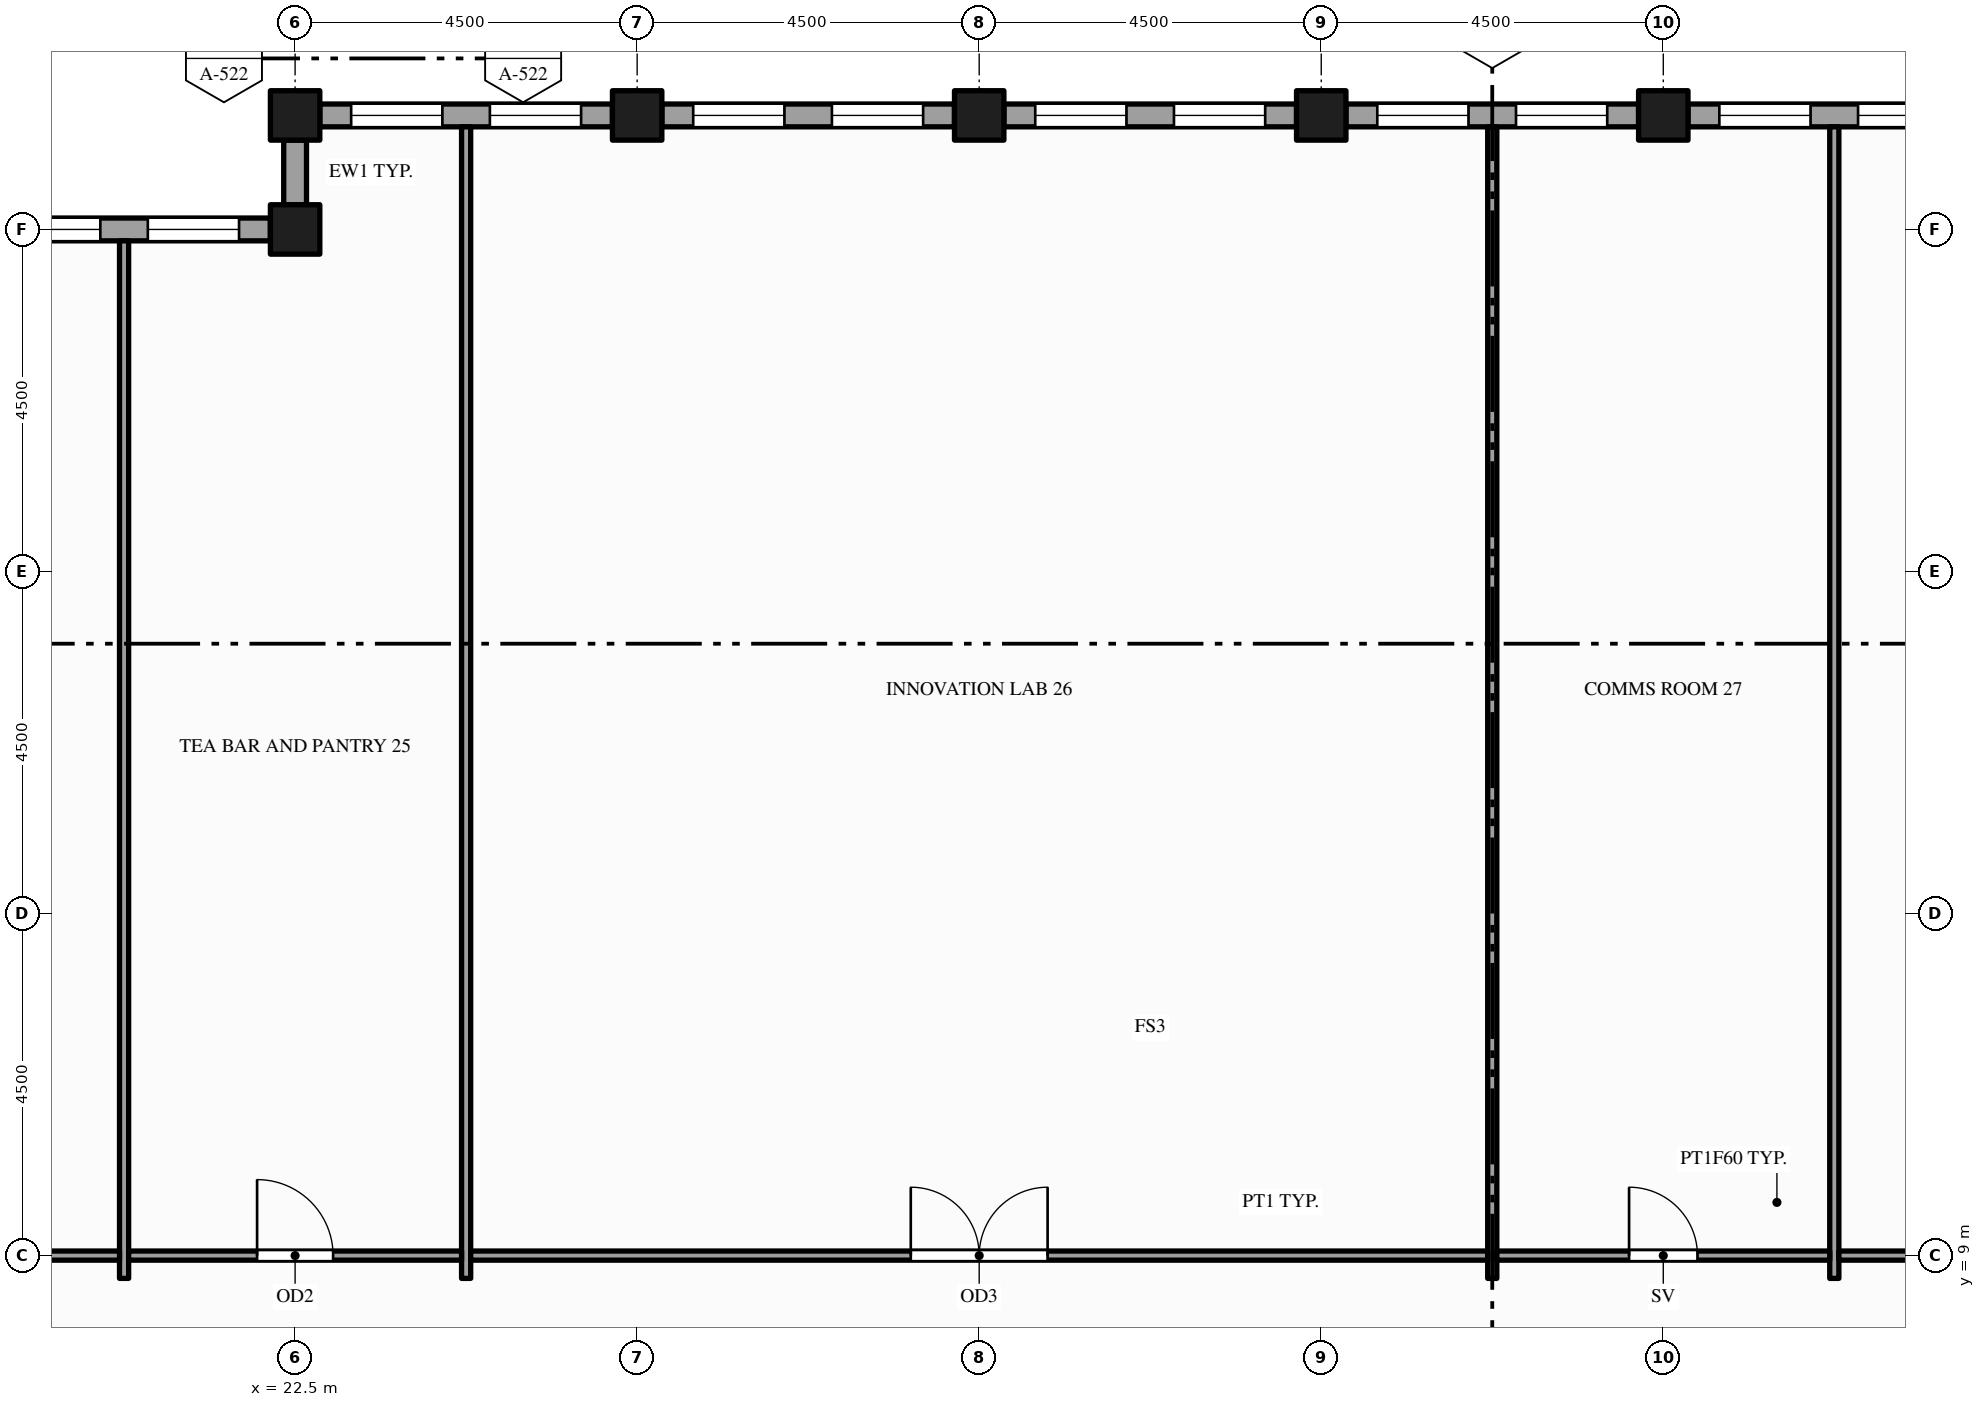
"""IFC4 building model, lengths in metres.
Left out: names, types, materials, properties, quantities, classifications, styles, units other than length and angle.
Written with IfcOpenShell. Run it as: python <this file> out.ifc"""

import sys

from ifc_helpers import new_model, si_unit, direction, frame, frame_2d, origin, origin_2d, place, context, subcontext, project, spatial, rectangle, hollow_rectangle, extrude, element, fill, save


model = new_model("IFC4")
c1 = context("Model", 3, precision=1e-05, world=origin(), true_north=direction((0.0, 1.0)))
c2 = subcontext(c1, "Body", "Model", "MODEL_VIEW")
j1 = project(units=[si_unit("LENGTHUNIT", "METRE"), si_unit("PLANEANGLEUNIT", "RADIAN")], contexts=[c1])
p1 = place(None, origin())
s1 = spatial("IfcSite", under=j1, at=p1, CompositionType="ELEMENT")
p2 = place(p1, origin())
s2 = spatial("IfcBuilding", under=s1, at=p2, CompositionType="ELEMENT")
p3 = place(p2, frame((0.0, 0.0, 269.0)))
s3 = spatial("IfcBuildingStorey", under=s2, at=p3, CompositionType="ELEMENT", Elevation=269.0)
for number, where, z_axis, x_axis in (
    (1, (22.5, 22.5, -0.15), (0.0, 0.0, 1.0), (1.0, 0.0, 0.0)),
    (2, (22.5, 24.0, -0.15), (0.0, 0.0, 1.0), (1.0, 0.0, 0.0)),
    (3, (27.0, 24.0, -0.15), (0.0, 0.0, 1.0), (1.0, 0.0, 0.0)),
    (4, (31.5, 24.0, -0.15), (0.0, 0.0, 1.0), (1.0, 0.0, 0.0)),
    (5, (36.0, 24.0, -0.15), (0.0, 0.0, 1.0), (1.0, 0.0, 0.0)),
    (6, (40.5, 24.0, -0.15), (0.0, 0.0, 1.0), (1.0, 0.0, 0.0)),
):
    element("IfcColumn", number, at=place(p3, frame(where, z_axis=z_axis, x_axis=x_axis)), inside=s3, PredefinedType="COLUMN", context=c2, shape_type="SweptSolid", body=[
        extrude(hollow_rectangle(XDim=0.65, YDim=0.65, WallThickness=0.032, at=origin_2d()), origin(), (0.0, 0.0, 1.0), 4.0),
    ])
p4 = place(p3, frame((44.675, 24.0, 0.0), z_axis=(0.0, 0.0, 1.0), x_axis=(-1.0, 0.0, 0.0)))
e7 = element("IfcWall", 7, at=p4, inside=s3, PredefinedType="STANDARD", context=c2, shape_type="SweptSolid", body=[
    extrude(rectangle(XDim=3.85, YDim=0.3, at=frame_2d((1.925, 0.0))), origin(), (0.0, 0.0, 1.0), 2.87),
])
p5 = place(p4, frame((0.413, 0.0, 0.9)))
e8 = element("IfcOpeningElement", 8, at=p5, cuts=e7, PredefinedType="OPENING", context=c2, shape_type="SweptSolid", body=[
    extrude(rectangle(XDim=1.2, YDim=1.75, at=frame_2d((0.6, 0.875))), frame((0.0, 0.16, 0.0), z_axis=(0.0, -1.0, 0.0), x_axis=(1.0, 0.0, 0.0)), (0.0, 0.0, 1.0), 0.32),
])
p6 = place(p4, frame((2.238, 0.0, 0.9)))
e9 = element("IfcOpeningElement", 9, at=p6, cuts=e7, PredefinedType="OPENING", context=c2, shape_type="SweptSolid", body=[
    extrude(rectangle(XDim=1.2, YDim=1.75, at=frame_2d((0.6, 0.875))), frame((0.0, 0.16, 0.0), z_axis=(0.0, -1.0, 0.0), x_axis=(1.0, 0.0, 0.0)), (0.0, 0.0, 1.0), 0.32),
])
p7 = place(p3, frame((40.175, 24.0, 0.0), z_axis=(0.0, 0.0, 1.0), x_axis=(-1.0, 0.0, 0.0)))
e10 = element("IfcWall", 10, at=p7, inside=s3, PredefinedType="STANDARD", context=c2, shape_type="SweptSolid", body=[
    extrude(rectangle(XDim=3.85, YDim=0.3, at=frame_2d((1.925, 0.0))), origin(), (0.0, 0.0, 1.0), 2.87),
])
p8 = place(p7, frame((0.413, 0.0, 0.9)))
e11 = element("IfcOpeningElement", 11, at=p8, cuts=e10, PredefinedType="OPENING", context=c2, shape_type="SweptSolid", body=[
    extrude(rectangle(XDim=1.2, YDim=1.75, at=frame_2d((0.6, 0.875))), frame((0.0, 0.16, 0.0), z_axis=(0.0, -1.0, 0.0), x_axis=(1.0, 0.0, 0.0)), (0.0, 0.0, 1.0), 0.32),
])
p9 = place(p7, frame((2.238, 0.0, 0.9)))
e12 = element("IfcOpeningElement", 12, at=p9, cuts=e10, PredefinedType="OPENING", context=c2, shape_type="SweptSolid", body=[
    extrude(rectangle(XDim=1.2, YDim=1.75, at=frame_2d((0.6, 0.875))), frame((0.0, 0.16, 0.0), z_axis=(0.0, -1.0, 0.0), x_axis=(1.0, 0.0, 0.0)), (0.0, 0.0, 1.0), 0.32),
])
p10 = place(p3, frame((35.675, 24.0, 0.0), z_axis=(0.0, 0.0, 1.0), x_axis=(-1.0, 0.0, 0.0)))
e13 = element("IfcWall", 13, at=p10, inside=s3, PredefinedType="STANDARD", context=c2, shape_type="SweptSolid", body=[
    extrude(rectangle(XDim=3.85, YDim=0.3, at=frame_2d((1.925, 0.0))), origin(), (0.0, 0.0, 1.0), 2.87),
])
p11 = place(p10, frame((0.413, 0.0, 0.9)))
e14 = element("IfcOpeningElement", 14, at=p11, cuts=e13, PredefinedType="OPENING", context=c2, shape_type="SweptSolid", body=[
    extrude(rectangle(XDim=1.2, YDim=1.75, at=frame_2d((0.6, 0.875))), frame((0.0, 0.16, 0.0), z_axis=(0.0, -1.0, 0.0), x_axis=(1.0, 0.0, 0.0)), (0.0, 0.0, 1.0), 0.32),
])
p12 = place(p10, frame((2.238, 0.0, 0.9)))
e15 = element("IfcOpeningElement", 15, at=p12, cuts=e13, PredefinedType="OPENING", context=c2, shape_type="SweptSolid", body=[
    extrude(rectangle(XDim=1.2, YDim=1.75, at=frame_2d((0.6, 0.875))), frame((0.0, 0.16, 0.0), z_axis=(0.0, -1.0, 0.0), x_axis=(1.0, 0.0, 0.0)), (0.0, 0.0, 1.0), 0.32),
])
p13 = place(p3, frame((31.175, 24.0, 0.0), z_axis=(0.0, 0.0, 1.0), x_axis=(-1.0, 0.0, 0.0)))
e16 = element("IfcWall", 16, at=p13, inside=s3, PredefinedType="STANDARD", context=c2, shape_type="SweptSolid", body=[
    extrude(rectangle(XDim=3.85, YDim=0.3, at=frame_2d((1.925, 0.0))), origin(), (0.0, 0.0, 1.0), 2.87),
])
p14 = place(p13, frame((0.413, 0.0, 0.9)))
e17 = element("IfcOpeningElement", 17, at=p14, cuts=e16, PredefinedType="OPENING", context=c2, shape_type="SweptSolid", body=[
    extrude(rectangle(XDim=1.2, YDim=1.75, at=frame_2d((0.6, 0.875))), frame((0.0, 0.16, 0.0), z_axis=(0.0, -1.0, 0.0), x_axis=(1.0, 0.0, 0.0)), (0.0, 0.0, 1.0), 0.32),
])
p15 = place(p13, frame((2.238, 0.0, 0.9)))
e18 = element("IfcOpeningElement", 18, at=p15, cuts=e16, PredefinedType="OPENING", context=c2, shape_type="SweptSolid", body=[
    extrude(rectangle(XDim=1.2, YDim=1.75, at=frame_2d((0.6, 0.875))), frame((0.0, 0.16, 0.0), z_axis=(0.0, -1.0, 0.0), x_axis=(1.0, 0.0, 0.0)), (0.0, 0.0, 1.0), 0.32),
])
p16 = place(p3, frame((26.675, 24.0, 0.0), z_axis=(0.0, 0.0, 1.0), x_axis=(-1.0, 0.0, 0.0)))
e19 = element("IfcWall", 19, at=p16, inside=s3, PredefinedType="STANDARD", context=c2, shape_type="SweptSolid", body=[
    extrude(rectangle(XDim=3.85, YDim=0.3, at=frame_2d((1.925, 0.0))), origin(), (0.0, 0.0, 1.0), 2.87),
])
p17 = place(p16, frame((0.413, 0.0, 0.9)))
e20 = element("IfcOpeningElement", 20, at=p17, cuts=e19, PredefinedType="OPENING", context=c2, shape_type="SweptSolid", body=[
    extrude(rectangle(XDim=1.2, YDim=1.75, at=frame_2d((0.6, 0.875))), frame((0.0, 0.16, 0.0), z_axis=(0.0, -1.0, 0.0), x_axis=(1.0, 0.0, 0.0)), (0.0, 0.0, 1.0), 0.32),
])
p18 = place(p16, frame((2.238, 0.0, 0.9)))
e21 = element("IfcOpeningElement", 21, at=p18, cuts=e19, PredefinedType="OPENING", context=c2, shape_type="SweptSolid", body=[
    extrude(rectangle(XDim=1.2, YDim=1.75, at=frame_2d((0.6, 0.875))), frame((0.0, 0.16, 0.0), z_axis=(0.0, -1.0, 0.0), x_axis=(1.0, 0.0, 0.0)), (0.0, 0.0, 1.0), 0.32),
])
p19 = place(p3, frame((22.5, 23.675, 0.0), z_axis=(0.0, 0.0, 1.0), x_axis=(0.0, -1.0, 0.0)))
e22 = element("IfcWall", 22, at=p19, inside=s3, PredefinedType="STANDARD", context=c2, shape_type="SweptSolid", body=[
    extrude(rectangle(XDim=0.85, YDim=0.3, at=frame_2d((0.425, 0.0))), origin(), (0.0, 0.0, 1.0), 3.162),
])
p20 = place(p3, frame((22.175, 22.5, 0.0), z_axis=(0.0, 0.0, 1.0), x_axis=(-1.0, 0.0, 0.0)))
e23 = element("IfcWall", 23, at=p20, inside=s3, PredefinedType="STANDARD", context=c2, shape_type="SweptSolid", body=[
    extrude(rectangle(XDim=3.85, YDim=0.3, at=frame_2d((1.925, 0.0))), origin(), (0.0, 0.0, 1.0), 2.87),
])
p21 = place(p20, frame((0.413, 0.0, 0.9)))
e24 = element("IfcOpeningElement", 24, at=p21, cuts=e23, PredefinedType="OPENING", context=c2, shape_type="SweptSolid", body=[
    extrude(rectangle(XDim=1.2, YDim=1.75, at=frame_2d((0.6, 0.875))), frame((0.0, 0.16, 0.0), z_axis=(0.0, -1.0, 0.0), x_axis=(1.0, 0.0, 0.0)), (0.0, 0.0, 1.0), 0.32),
])
p22 = place(p20, frame((2.238, 0.0, 0.9)))
e25 = element("IfcOpeningElement", 25, at=p22, cuts=e23, PredefinedType="OPENING", context=c2, shape_type="SweptSolid", body=[
    extrude(rectangle(XDim=1.2, YDim=1.75, at=frame_2d((0.6, 0.875))), frame((0.0, 0.16, 0.0), z_axis=(0.0, -1.0, 0.0), x_axis=(1.0, 0.0, 0.0)), (0.0, 0.0, 1.0), 0.32),
])
p23 = place(p3, frame((20.25, 8.7, 0.0), z_axis=(0.0, 0.0, 1.0), x_axis=(0.0, 1.0, 0.0)))
e26 = element("IfcWall", 26, at=p23, inside=s3, PredefinedType="PARTITIONING", context=c2, shape_type="SweptSolid", body=[
    extrude(rectangle(XDim=13.65, YDim=0.12, at=frame_2d((6.825, 0.0))), origin(), (0.0, 0.0, 1.0), 2.87),
])
for number, where, z_axis, x_axis in (
    (27, (24.75, 8.7, 0.0), (0.0, 0.0, 1.0), (0.0, 1.0, 0.0)),
    (28, (38.25, 8.7, 0.0), (0.0, 0.0, 1.0), (0.0, 1.0, 0.0)),
    (29, (42.75, 8.7, 0.0), (0.0, 0.0, 1.0), (0.0, 1.0, 0.0)),
):
    element("IfcWall", number, at=place(p3, frame(where, z_axis=z_axis, x_axis=x_axis)), inside=s3, PredefinedType="PARTITIONING", context=c2, shape_type="SweptSolid", body=[
        extrude(rectangle(XDim=15.15, YDim=0.12, at=frame_2d((7.575, 0.0))), origin(), (0.0, 0.0, 1.0), 2.87),
    ])
p24 = place(p3, frame((13.56, 9.0, 0.0), z_axis=(0.0, 0.0, 1.0), x_axis=(1.0, 0.0, 0.0)))
e30 = element("IfcWall", 30, at=p24, inside=s3, PredefinedType="PARTITIONING", context=c2, shape_type="SweptSolid", body=[
    extrude(rectangle(XDim=6.63, YDim=0.12, at=frame_2d((3.315, 0.0))), origin(), (0.0, 0.0, 1.0), 2.87),
])
p25 = place(p24, frame((2.815, 0.0, 0.0)))
e31 = element("IfcOpeningElement", 31, at=p25, cuts=e30, PredefinedType="OPENING", context=c2, shape_type="SweptSolid", body=[
    extrude(rectangle(XDim=1.0, YDim=2.1, at=frame_2d((0.5, 1.05))), frame((0.0, 0.07, 0.0), z_axis=(0.0, -1.0, 0.0), x_axis=(1.0, 0.0, 0.0)), (0.0, 0.0, 1.0), 0.14),
])
p26 = place(p3, frame((20.31, 9.0, 0.0), z_axis=(0.0, 0.0, 1.0), x_axis=(1.0, 0.0, 0.0)))
e32 = element("IfcWall", 32, at=p26, inside=s3, PredefinedType="PARTITIONING", context=c2, shape_type="SweptSolid", body=[
    extrude(rectangle(XDim=4.38, YDim=0.12, at=frame_2d((2.19, 0.0))), origin(), (0.0, 0.0, 1.0), 2.87),
])
p27 = place(p26, frame((1.69, 0.0, 0.0)))
e33 = element("IfcOpeningElement", 33, at=p27, cuts=e32, PredefinedType="OPENING", context=c2, shape_type="SweptSolid", body=[
    extrude(rectangle(XDim=1.0, YDim=2.1, at=frame_2d((0.5, 1.05))), frame((0.0, 0.07, 0.0), z_axis=(0.0, -1.0, 0.0), x_axis=(1.0, 0.0, 0.0)), (0.0, 0.0, 1.0), 0.14),
])
p28 = place(p3, frame((24.81, 9.0, 0.0), z_axis=(0.0, 0.0, 1.0), x_axis=(1.0, 0.0, 0.0)))
e34 = element("IfcWall", 34, at=p28, inside=s3, PredefinedType="PARTITIONING", context=c2, shape_type="SweptSolid", body=[
    extrude(rectangle(XDim=13.38, YDim=0.12, at=frame_2d((6.69, 0.0))), origin(), (0.0, 0.0, 1.0), 2.87),
])
p29 = place(p28, frame((5.79, 0.0, 0.0)))
e35 = element("IfcOpeningElement", 35, at=p29, cuts=e34, PredefinedType="OPENING", context=c2, shape_type="SweptSolid", body=[
    extrude(rectangle(XDim=1.8, YDim=2.1, at=frame_2d((0.9, 1.05))), frame((0.0, 0.07, 0.0), z_axis=(0.0, -1.0, 0.0), x_axis=(1.0, 0.0, 0.0)), (0.0, 0.0, 1.0), 0.14),
])
p30 = place(p3, frame((38.31, 9.0, 0.0), z_axis=(0.0, 0.0, 1.0), x_axis=(1.0, 0.0, 0.0)))
e36 = element("IfcWall", 36, at=p30, inside=s3, PredefinedType="PARTITIONING", context=c2, shape_type="SweptSolid", body=[
    extrude(rectangle(XDim=4.38, YDim=0.12, at=frame_2d((2.19, 0.0))), origin(), (0.0, 0.0, 1.0), 2.87),
])
p31 = place(p30, frame((1.74, 0.0, 0.0)))
e37 = element("IfcOpeningElement", 37, at=p31, cuts=e36, PredefinedType="OPENING", context=c2, shape_type="SweptSolid", body=[
    extrude(rectangle(XDim=0.9, YDim=2.1, at=frame_2d((0.45, 1.05))), frame((0.0, 0.07, 0.0), z_axis=(0.0, -1.0, 0.0), x_axis=(1.0, 0.0, 0.0)), (0.0, 0.0, 1.0), 0.14),
])
p32 = place(p3, frame((42.81, 9.0, 0.0), z_axis=(0.0, 0.0, 1.0), x_axis=(1.0, 0.0, 0.0)))
e38 = element("IfcWall", 38, at=p32, inside=s3, PredefinedType="PARTITIONING", context=c2, shape_type="SweptSolid", body=[
    extrude(rectangle(XDim=6.63, YDim=0.12, at=frame_2d((3.315, 0.0))), origin(), (0.0, 0.0, 1.0), 2.87),
])
p33 = place(p32, frame((2.815, 0.0, 0.0)))
e39 = element("IfcOpeningElement", 39, at=p33, cuts=e38, PredefinedType="OPENING", context=c2, shape_type="SweptSolid", body=[
    extrude(rectangle(XDim=1.0, YDim=2.1, at=frame_2d((0.5, 1.05))), frame((0.0, 0.07, 0.0), z_axis=(0.0, -1.0, 0.0), x_axis=(1.0, 0.0, 0.0)), (0.0, 0.0, 1.0), 0.14),
])
p34 = place(p5, origin())
e40 = element("IfcWindow", 40, at=p34, inside=s3, PartitioningType="SINGLE_PANEL", PredefinedType="WINDOW", context=c2, shape_type="SweptSolid", body=[
    extrude(rectangle(XDim=1.2, YDim=1.75, at=frame_2d((0.6, 0.875))), frame((0.0, 0.03, 0.0), z_axis=(0.0, -1.0, 0.0), x_axis=(1.0, 0.0, 0.0)), (0.0, 0.0, 1.0), 0.06),
])
fill(e8, e40)
p35 = place(p6, origin())
e41 = element("IfcWindow", 41, at=p35, inside=s3, PartitioningType="SINGLE_PANEL", PredefinedType="WINDOW", context=c2, shape_type="SweptSolid", body=[
    extrude(rectangle(XDim=1.2, YDim=1.75, at=frame_2d((0.6, 0.875))), frame((0.0, 0.03, 0.0), z_axis=(0.0, -1.0, 0.0), x_axis=(1.0, 0.0, 0.0)), (0.0, 0.0, 1.0), 0.06),
])
fill(e9, e41)
p36 = place(p8, origin())
e42 = element("IfcWindow", 42, at=p36, inside=s3, PartitioningType="SINGLE_PANEL", PredefinedType="WINDOW", context=c2, shape_type="SweptSolid", body=[
    extrude(rectangle(XDim=1.2, YDim=1.75, at=frame_2d((0.6, 0.875))), frame((0.0, 0.03, 0.0), z_axis=(0.0, -1.0, 0.0), x_axis=(1.0, 0.0, 0.0)), (0.0, 0.0, 1.0), 0.06),
])
fill(e11, e42)
p37 = place(p9, origin())
e43 = element("IfcWindow", 43, at=p37, inside=s3, PartitioningType="SINGLE_PANEL", PredefinedType="WINDOW", context=c2, shape_type="SweptSolid", body=[
    extrude(rectangle(XDim=1.2, YDim=1.75, at=frame_2d((0.6, 0.875))), frame((0.0, 0.03, 0.0), z_axis=(0.0, -1.0, 0.0), x_axis=(1.0, 0.0, 0.0)), (0.0, 0.0, 1.0), 0.06),
])
fill(e12, e43)
p38 = place(p11, origin())
e44 = element("IfcWindow", 44, at=p38, inside=s3, PartitioningType="SINGLE_PANEL", PredefinedType="WINDOW", context=c2, shape_type="SweptSolid", body=[
    extrude(rectangle(XDim=1.2, YDim=1.75, at=frame_2d((0.6, 0.875))), frame((0.0, 0.03, 0.0), z_axis=(0.0, -1.0, 0.0), x_axis=(1.0, 0.0, 0.0)), (0.0, 0.0, 1.0), 0.06),
])
fill(e14, e44)
p39 = place(p12, origin())
e45 = element("IfcWindow", 45, at=p39, inside=s3, PartitioningType="SINGLE_PANEL", PredefinedType="WINDOW", context=c2, shape_type="SweptSolid", body=[
    extrude(rectangle(XDim=1.2, YDim=1.75, at=frame_2d((0.6, 0.875))), frame((0.0, 0.03, 0.0), z_axis=(0.0, -1.0, 0.0), x_axis=(1.0, 0.0, 0.0)), (0.0, 0.0, 1.0), 0.06),
])
fill(e15, e45)
p40 = place(p14, origin())
e46 = element("IfcWindow", 46, at=p40, inside=s3, PartitioningType="SINGLE_PANEL", PredefinedType="WINDOW", context=c2, shape_type="SweptSolid", body=[
    extrude(rectangle(XDim=1.2, YDim=1.75, at=frame_2d((0.6, 0.875))), frame((0.0, 0.03, 0.0), z_axis=(0.0, -1.0, 0.0), x_axis=(1.0, 0.0, 0.0)), (0.0, 0.0, 1.0), 0.06),
])
fill(e17, e46)
p41 = place(p15, origin())
e47 = element("IfcWindow", 47, at=p41, inside=s3, PartitioningType="SINGLE_PANEL", PredefinedType="WINDOW", context=c2, shape_type="SweptSolid", body=[
    extrude(rectangle(XDim=1.2, YDim=1.75, at=frame_2d((0.6, 0.875))), frame((0.0, 0.03, 0.0), z_axis=(0.0, -1.0, 0.0), x_axis=(1.0, 0.0, 0.0)), (0.0, 0.0, 1.0), 0.06),
])
fill(e18, e47)
p42 = place(p17, origin())
e48 = element("IfcWindow", 48, at=p42, inside=s3, PartitioningType="SINGLE_PANEL", PredefinedType="WINDOW", context=c2, shape_type="SweptSolid", body=[
    extrude(rectangle(XDim=1.2, YDim=1.75, at=frame_2d((0.6, 0.875))), frame((0.0, 0.03, 0.0), z_axis=(0.0, -1.0, 0.0), x_axis=(1.0, 0.0, 0.0)), (0.0, 0.0, 1.0), 0.06),
])
fill(e20, e48)
p43 = place(p18, origin())
e49 = element("IfcWindow", 49, at=p43, inside=s3, PartitioningType="SINGLE_PANEL", PredefinedType="WINDOW", context=c2, shape_type="SweptSolid", body=[
    extrude(rectangle(XDim=1.2, YDim=1.75, at=frame_2d((0.6, 0.875))), frame((0.0, 0.03, 0.0), z_axis=(0.0, -1.0, 0.0), x_axis=(1.0, 0.0, 0.0)), (0.0, 0.0, 1.0), 0.06),
])
fill(e21, e49)
p44 = place(p21, origin())
e50 = element("IfcWindow", 50, at=p44, inside=s3, PartitioningType="SINGLE_PANEL", PredefinedType="WINDOW", context=c2, shape_type="SweptSolid", body=[
    extrude(rectangle(XDim=1.2, YDim=1.75, at=frame_2d((0.6, 0.875))), frame((0.0, 0.03, 0.0), z_axis=(0.0, -1.0, 0.0), x_axis=(1.0, 0.0, 0.0)), (0.0, 0.0, 1.0), 0.06),
])
fill(e24, e50)
p45 = place(p22, origin())
e51 = element("IfcWindow", 51, at=p45, inside=s3, PartitioningType="SINGLE_PANEL", PredefinedType="WINDOW", context=c2, shape_type="SweptSolid", body=[
    extrude(rectangle(XDim=1.2, YDim=1.75, at=frame_2d((0.6, 0.875))), frame((0.0, 0.03, 0.0), z_axis=(0.0, -1.0, 0.0), x_axis=(1.0, 0.0, 0.0)), (0.0, 0.0, 1.0), 0.06),
])
fill(e25, e51)
p46 = place(p27, origin())
e52 = element("IfcDoor", 52, at=p46, inside=s3, OperationType="SINGLE_SWING_LEFT", PredefinedType="DOOR", context=c2, shape_type="SweptSolid", body=[
    extrude(rectangle(XDim=1.0, YDim=2.1, at=frame_2d((0.5, 1.05))), frame((0.0, 0.025, 0.0), z_axis=(0.0, -1.0, 0.0), x_axis=(1.0, 0.0, 0.0)), (0.0, 0.0, 1.0), 0.05),
])
fill(e33, e52)
p47 = place(p29, origin())
e53 = element("IfcDoor", 53, at=p47, inside=s3, OperationType="DOUBLE_DOOR_SINGLE_SWING", PredefinedType="DOOR", context=c2, shape_type="SweptSolid", body=[
    extrude(rectangle(XDim=1.8, YDim=2.1, at=frame_2d((0.9, 1.05))), frame((0.0, 0.025, 0.0), z_axis=(0.0, -1.0, 0.0), x_axis=(1.0, 0.0, 0.0)), (0.0, 0.0, 1.0), 0.05),
])
fill(e35, e53)
p48 = place(p31, origin())
e54 = element("IfcDoor", 54, at=p48, inside=s3, OperationType="SINGLE_SWING_LEFT", PredefinedType="DOOR", context=c2, shape_type="SweptSolid", body=[
    extrude(rectangle(XDim=0.9, YDim=2.1, at=frame_2d((0.45, 1.05))), frame((0.0, 0.025, 0.0), z_axis=(0.0, -1.0, 0.0), x_axis=(1.0, 0.0, 0.0)), (0.0, 0.0, 1.0), 0.05),
])
fill(e37, e54)
save(model, sys.argv[1])
